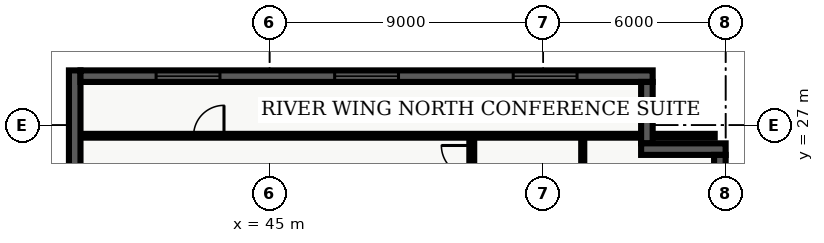
"""IFC4 building model, lengths in metres.
Left out: names, types, materials, properties, quantities, classifications, styles, units other than length and angle.
Written with IfcOpenShell. Run it as: python <this file> out.ifc"""

import sys

from ifc_helpers import new_model, entity, si_unit, converted_unit, direction, frame, origin_with_axes, origin_2d_with_axis, place, context, subcontext, project, spatial, polyline, rectangle, outline, extrude, element, fill, save


model = new_model("IFC4")
c1 = context("Model", 3, precision=1e-05, world=origin_with_axes(), true_north=direction((0.0, 1.0)))
c2 = subcontext(c1, "Body", "Model", "MODEL_VIEW")
j1 = project(units=[si_unit("LENGTHUNIT", "METRE"), converted_unit("PLANEANGLEUNIT", "DEGREE", entity("IfcPlaneAngleMeasure", 0.017), si_unit("PLANEANGLEUNIT", "RADIAN"), dimensions=[0, 0, 0, 0, 0, 0, 0])], contexts=[c1])
p1 = place(None, origin_with_axes())
s1 = spatial("IfcSite", under=j1, at=p1, CompositionType="ELEMENT")
p2 = place(p1, origin_with_axes())
s2 = spatial("IfcBuilding", under=s1, at=p2, CompositionType="ELEMENT")
p3 = place(p2, frame((0.0, 0.0, 48.3), z_axis=(0.0, 0.0, 1.0), x_axis=(1.0, 0.0, 0.0)))
s3 = spatial("IfcBuildingStorey", under=s2, at=p3, CompositionType="ELEMENT", Elevation=48.3)
p4 = place(p3, frame((51.65, 7.85, 0.0), z_axis=(0.0, 0.0, 1.0), x_axis=(0.0, 1.0, 0.0)))
e1 = element("IfcWall", 1, at=p4, inside=s3, PredefinedType="PARTITIONING", context=c2, shape_type="SweptSolid", body=[
    extrude(outline(polyline([(0.0, -0.08), (18.8, -0.08), (18.8, 0.08), (0.0, 0.08), (0.0, -0.08)])), origin_with_axes(), (0.0, 0.0, 1.0), 2.7),
])
p5 = place(p4, frame((4.453, 0.0, 0.0), z_axis=(0.0, 0.0, 1.0), x_axis=(1.0, 0.0, 0.0)))
e2 = element("IfcOpeningElement", 2, at=p5, cuts=e1, PredefinedType="OPENING", context=c2, shape_type="SweptSolid", body=[
    extrude(rectangle(XDim=1.0, YDim=0.18, at=origin_2d_with_axis()), origin_with_axes(), (0.0, 0.0, 1.0), 2.15),
])
p6 = place(p4, frame((7.831, 0.0, 0.0), z_axis=(0.0, 0.0, 1.0), x_axis=(1.0, 0.0, 0.0)))
e3 = element("IfcOpeningElement", 3, at=p6, cuts=e1, PredefinedType="OPENING", context=c2, shape_type="SweptSolid", body=[
    extrude(rectangle(XDim=1.0, YDim=0.18, at=origin_2d_with_axis()), origin_with_axes(), (0.0, 0.0, 1.0), 2.15),
])
p7 = place(p4, frame((11.898, 0.0, 0.0), z_axis=(0.0, 0.0, 1.0), x_axis=(1.0, 0.0, 0.0)))
e4 = element("IfcOpeningElement", 4, at=p7, cuts=e1, PredefinedType="OPENING", context=c2, shape_type="SweptSolid", body=[
    extrude(rectangle(XDim=1.0, YDim=0.18, at=origin_2d_with_axis()), origin_with_axes(), (0.0, 0.0, 1.0), 2.15),
])
p8 = place(p4, frame((17.98, 0.0, 0.0), z_axis=(0.0, 0.0, 1.0), x_axis=(1.0, 0.0, 0.0)))
e5 = element("IfcOpeningElement", 5, at=p8, cuts=e1, PredefinedType="OPENING", context=c2, shape_type="SweptSolid", body=[
    extrude(rectangle(XDim=1.0, YDim=0.18, at=origin_2d_with_axis()), origin_with_axes(), (0.0, 0.0, 1.0), 2.15),
])
p9 = place(p3, frame((38.76, 26.65, 0.0), z_axis=(0.0, 0.0, 1.0), x_axis=(1.0, 0.0, 0.0)))
e6 = element("IfcWall", 6, at=p9, inside=s3, PredefinedType="PARTITIONING", context=c2, shape_type="SweptSolid", body=[
    extrude(outline(polyline([(0.0, -0.062), (20.88, -0.062), (20.88, 0.062), (0.0, 0.062), (0.0, -0.062)])), origin_with_axes(), (0.0, 0.0, 1.0), 2.7),
])
p10 = place(p9, frame((4.24, 0.0, 0.0), z_axis=(0.0, 0.0, 1.0), x_axis=(1.0, 0.0, 0.0)))
e7 = element("IfcOpeningElement", 7, at=p10, cuts=e6, PredefinedType="OPENING", context=c2, shape_type="SweptSolid", body=[
    extrude(rectangle(XDim=1.0, YDim=0.145, at=origin_2d_with_axis()), origin_with_axes(), (0.0, 0.0, 1.0), 2.15),
])
p11 = place(p3, frame((55.3, 7.98, 0.0), z_axis=(0.0, 0.0, 1.0), x_axis=(0.0, 1.0, 0.0)))
e8 = element("IfcWall", 8, at=p11, inside=s3, PredefinedType="PARTITIONING", context=c2, shape_type="SweptSolid", body=[
    extrude(outline(polyline([(0.0, -0.05), (18.54, -0.05), (18.54, 0.05), (0.0, 0.05), (0.0, -0.05)])), origin_with_axes(), (0.0, 0.0, 1.0), 2.7),
])
p12 = place(p11, frame((3.073, 0.0, 0.0), z_axis=(0.0, 0.0, 1.0), x_axis=(1.0, 0.0, 0.0)))
e9 = element("IfcOpeningElement", 9, at=p12, cuts=e8, PredefinedType="OPENING", context=c2, shape_type="SweptSolid", body=[
    extrude(rectangle(XDim=0.95, YDim=0.12, at=origin_2d_with_axis()), origin_with_axes(), (0.0, 0.0, 1.0), 2.15),
])
p13 = place(p11, frame((7.981, 0.0, 0.0), z_axis=(0.0, 0.0, 1.0), x_axis=(1.0, 0.0, 0.0)))
e10 = element("IfcOpeningElement", 10, at=p13, cuts=e8, PredefinedType="OPENING", context=c2, shape_type="SweptSolid", body=[
    extrude(rectangle(XDim=0.95, YDim=0.12, at=origin_2d_with_axis()), origin_with_axes(), (0.0, 0.0, 1.0), 2.15),
])
p14 = place(p11, frame((11.768, 0.0, 0.0), z_axis=(0.0, 0.0, 1.0), x_axis=(1.0, 0.0, 0.0)))
e11 = element("IfcOpeningElement", 11, at=p14, cuts=e8, PredefinedType="OPENING", context=c2, shape_type="SweptSolid", body=[
    extrude(rectangle(XDim=0.95, YDim=0.12, at=origin_2d_with_axis()), origin_with_axes(), (0.0, 0.0, 1.0), 2.15),
])
p15 = place(p11, frame((16.201, 0.0, 0.0), z_axis=(0.0, 0.0, 1.0), x_axis=(1.0, 0.0, 0.0)))
e12 = element("IfcOpeningElement", 12, at=p15, cuts=e8, PredefinedType="OPENING", context=c2, shape_type="SweptSolid", body=[
    extrude(rectangle(XDim=0.95, YDim=0.12, at=origin_2d_with_axis()), origin_with_axes(), (0.0, 0.0, 1.0), 2.15),
])
p16 = place(p3, frame((38.59, 21.22, 0.0), z_axis=(0.0, 0.0, 1.0), x_axis=(0.0, 1.0, 0.0)))
e13 = element("IfcWall", 13, at=p16, inside=s3, PredefinedType="SOLIDWALL", context=c2, shape_type="SweptSolid", body=[
    extrude(outline(polyline([(0.0, -0.19), (7.58, -0.19), (7.58, 0.19), (0.0, 0.19), (0.0, -0.19)])), origin_with_axes(), (0.0, 0.0, 1.0), 3.66),
])
p17 = place(p3, frame((38.78, 28.61, 0.0), z_axis=(0.0, 0.0, 1.0), x_axis=(1.0, 0.0, 0.0)))
e14 = element("IfcWall", 14, at=p17, inside=s3, PredefinedType="SOLIDWALL", context=c2, shape_type="SweptSolid", body=[
    extrude(outline(polyline([(0.0, -0.19), (18.82, -0.19), (18.82, 0.19), (0.0, 0.19), (0.0, -0.19)])), origin_with_axes(), (0.0, 0.0, 1.0), 3.66),
])
p18 = place(p17, frame((3.537, 0.0, 0.45), z_axis=(0.0, 0.0, 1.0), x_axis=(1.0, 0.0, 0.0)))
e15 = element("IfcOpeningElement", 15, at=p18, cuts=e14, PredefinedType="OPENING", context=c2, shape_type="SweptSolid", body=[
    extrude(rectangle(XDim=2.1, YDim=0.4, at=origin_2d_with_axis()), origin_with_axes(), (0.0, 0.0, 1.0), 2.2),
])
p19 = place(p17, frame((9.41, 0.0, 0.45), z_axis=(0.0, 0.0, 1.0), x_axis=(1.0, 0.0, 0.0)))
e16 = element("IfcOpeningElement", 16, at=p19, cuts=e14, PredefinedType="OPENING", context=c2, shape_type="SweptSolid", body=[
    extrude(rectangle(XDim=2.1, YDim=0.4, at=origin_2d_with_axis()), origin_with_axes(), (0.0, 0.0, 1.0), 2.2),
])
p20 = place(p17, frame((15.283, 0.0, 0.45), z_axis=(0.0, 0.0, 1.0), x_axis=(1.0, 0.0, 0.0)))
e17 = element("IfcOpeningElement", 17, at=p20, cuts=e14, PredefinedType="OPENING", context=c2, shape_type="SweptSolid", body=[
    extrude(rectangle(XDim=2.1, YDim=0.4, at=origin_2d_with_axis()), origin_with_axes(), (0.0, 0.0, 1.0), 2.2),
])
p21 = place(p3, frame((57.41, 28.42, 0.0), z_axis=(0.0, 0.0, 1.0), x_axis=(0.0, -1.0, 0.0)))
e18 = element("IfcWall", 18, at=p21, inside=s3, PredefinedType="SOLIDWALL", context=c2, shape_type="SweptSolid", body=[
    extrude(outline(polyline([(0.0, -0.19), (2.02, -0.19), (2.02, 0.19), (0.0, 0.19), (0.0, -0.19)])), origin_with_axes(), (0.0, 0.0, 1.0), 3.66),
])
p22 = place(p3, frame((57.22, 26.21, 0.0), z_axis=(0.0, 0.0, 1.0), x_axis=(1.0, 0.0, 0.0)))
e19 = element("IfcWall", 19, at=p22, inside=s3, PredefinedType="SOLIDWALL", context=c2, shape_type="SweptSolid", body=[
    extrude(outline(polyline([(0.0, -0.19), (2.78, -0.19), (2.78, 0.19), (0.0, 0.19), (0.0, -0.19)])), origin_with_axes(), (0.0, 0.0, 1.0), 3.66),
])
p23 = place(p3, frame((59.81, 26.02, 0.0), z_axis=(0.0, 0.0, 1.0), x_axis=(0.0, -1.0, 0.0)))
e20 = element("IfcWall", 20, at=p23, inside=s3, PredefinedType="SOLIDWALL", context=c2, shape_type="SweptSolid", body=[
    extrude(outline(polyline([(0.0, -0.19), (23.62, -0.19), (23.62, 0.19), (0.0, 0.19), (0.0, -0.19)])), origin_with_axes(), (0.0, 0.0, 1.0), 3.66),
])
p24 = place(p23, frame((20.218, 0.0, 0.45), z_axis=(0.0, 0.0, 1.0), x_axis=(1.0, 0.0, 0.0)))
e21 = element("IfcOpeningElement", 21, at=p24, cuts=e20, PredefinedType="OPENING", context=c2, shape_type="SweptSolid", body=[
    extrude(rectangle(XDim=2.1, YDim=0.4, at=origin_2d_with_axis()), origin_with_axes(), (0.0, 0.0, 1.0), 2.2),
])
p25 = place(p9, frame((4.24, 0.0, 0.0), z_axis=(0.0, 0.0, 1.0), x_axis=(1.0, 0.0, 0.0)))
e22 = element("IfcDoor", 22, at=p25, inside=s3, OperationType="SINGLE_SWING_RIGHT", PredefinedType="DOOR", context=c2, shape_type="SweptSolid", body=[
    extrude(rectangle(XDim=1.0, YDim=0.075, at=origin_2d_with_axis()), origin_with_axes(), (0.0, 0.0, 1.0), 2.15),
])
fill(e7, e22)
p26 = place(p4, frame((17.98, 0.0, 0.0), z_axis=(0.0, 0.0, 1.0), x_axis=(1.0, 0.0, 0.0)))
e23 = element("IfcDoor", 23, at=p26, inside=s3, OperationType="SINGLE_SWING_RIGHT", PredefinedType="DOOR", context=c2, shape_type="SweptSolid", body=[
    extrude(rectangle(XDim=1.0, YDim=0.09, at=origin_2d_with_axis()), origin_with_axes(), (0.0, 0.0, 1.0), 2.15),
])
fill(e5, e23)
p27 = place(p17, frame((3.537, 0.0, 0.45), z_axis=(0.0, 0.0, 1.0), x_axis=(1.0, 0.0, 0.0)))
e24 = element("IfcWindow", 24, at=p27, inside=s3, PredefinedType="WINDOW", context=c2, shape_type="SweptSolid", body=[
    extrude(rectangle(XDim=2.1, YDim=0.09, at=origin_2d_with_axis()), origin_with_axes(), (0.0, 0.0, 1.0), 2.2),
])
fill(e15, e24)
p28 = place(p17, frame((9.41, 0.0, 0.45), z_axis=(0.0, 0.0, 1.0), x_axis=(1.0, 0.0, 0.0)))
e25 = element("IfcWindow", 25, at=p28, inside=s3, PredefinedType="WINDOW", context=c2, shape_type="SweptSolid", body=[
    extrude(rectangle(XDim=2.1, YDim=0.09, at=origin_2d_with_axis()), origin_with_axes(), (0.0, 0.0, 1.0), 2.2),
])
fill(e16, e25)
p29 = place(p17, frame((15.283, 0.0, 0.45), z_axis=(0.0, 0.0, 1.0), x_axis=(1.0, 0.0, 0.0)))
e26 = element("IfcWindow", 26, at=p29, inside=s3, PredefinedType="WINDOW", context=c2, shape_type="SweptSolid", body=[
    extrude(rectangle(XDim=2.1, YDim=0.09, at=origin_2d_with_axis()), origin_with_axes(), (0.0, 0.0, 1.0), 2.2),
])
fill(e17, e26)
save(model, sys.argv[1])
